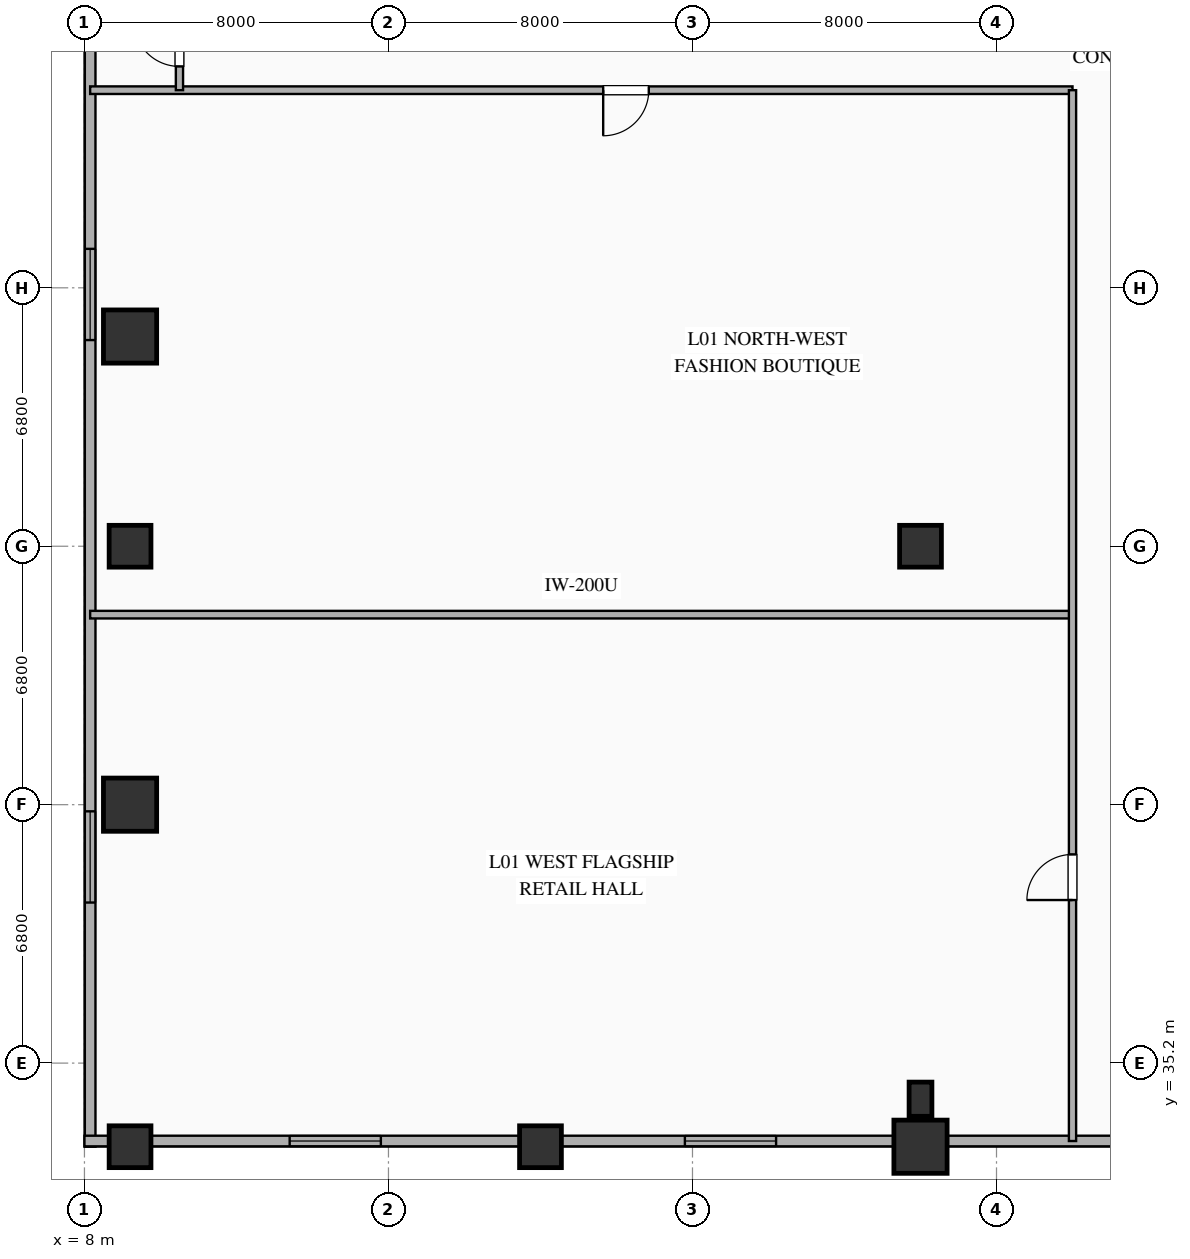
"""IFC4 building model, lengths in metres.
Left out: names, types, materials, properties, quantities, classifications, styles, units other than length and angle.
Written with IfcOpenShell. Run it as: python <this file> out.ifc"""

import sys

from ifc_helpers import new_model, si_unit, direction, frame, frame_2d, origin, origin_2d, place, context, subcontext, project, spatial, rectangle, extrude, element, fill, save


model = new_model("IFC4")
c1 = context("Model", 3, precision=1e-05, world=origin(), true_north=direction((0.0, 1.0)))
c2 = subcontext(c1, "Body", "Model", "MODEL_VIEW")
j1 = project(units=[si_unit("LENGTHUNIT", "METRE"), si_unit("PLANEANGLEUNIT", "RADIAN")], contexts=[c1])
p1 = place(None, origin())
s1 = spatial("IfcSite", under=j1, at=p1, CompositionType="ELEMENT")
p2 = place(p1, origin())
s2 = spatial("IfcBuilding", under=s1, at=p2, CompositionType="ELEMENT")
p3 = place(p2, frame((0.0, 0.0, 6.0)))
s3 = spatial("IfcBuildingStorey", under=s2, at=p3, CompositionType="ELEMENT", Elevation=6.0)
for number, where, z_axis, x_axis in (
    (1, (9.2, 33.0, 0.0), (0.0, 0.0, 1.0), (1.0, 0.0, 0.0)),
    (2, (9.2, 48.8, 0.0), (0.0, 0.0, 1.0), (1.0, 0.0, 0.0)),
    (3, (20.0, 33.0, 0.0), (0.0, 0.0, 1.0), (1.0, 0.0, 0.0)),
):
    element("IfcColumn", number, at=place(p3, frame(where, z_axis=z_axis, x_axis=x_axis)), inside=s3, PredefinedType="COLUMN", context=c2, shape_type="SweptSolid", body=[
        extrude(rectangle(XDim=1.1, YDim=1.1, at=origin_2d()), origin(), (0.0, 0.0, 1.0), 5.12),
    ])
p4 = place(p3, frame((30.0, 33.0, 0.0), z_axis=(0.0, 0.0, 1.0), x_axis=(1.0, 0.0, 0.0)))
e4 = element("IfcColumn", 4, at=p4, inside=s3, PredefinedType="COLUMN", context=c2, shape_type="SweptSolid", body=[
    extrude(rectangle(XDim=1.4, YDim=1.4, at=origin_2d()), origin(), (0.0, 0.0, 1.0), 5.12),
])
p5 = place(p3, frame((30.0, 48.8, 0.0), z_axis=(0.0, 0.0, 1.0), x_axis=(1.0, 0.0, 0.0)))
e5 = element("IfcColumn", 5, at=p5, inside=s3, PredefinedType="COLUMN", context=c2, shape_type="SweptSolid", body=[
    extrude(rectangle(XDim=1.1, YDim=1.1, at=origin_2d()), origin(), (0.0, 0.0, 1.0), 5.12),
])
for number, where, z_axis, x_axis in (
    (6, (9.2, 54.318, 0.0), (0.0, 0.0, 1.0), (1.0, 0.0, 0.0)),
    (7, (9.2, 42.0, 0.0), (0.0, 0.0, 1.0), (1.0, 0.0, 0.0)),
):
    element("IfcColumn", number, at=place(p3, frame(where, z_axis=z_axis, x_axis=x_axis)), inside=s3, PredefinedType="COLUMN", context=c2, shape_type="SweptSolid", body=[
        extrude(rectangle(XDim=1.4, YDim=1.4, at=origin_2d()), origin(), (0.0, 0.0, 1.0), 5.12),
    ])
p6 = place(p3, frame((30.0, 34.25, 0.0), z_axis=(0.0, 0.0, 1.0), x_axis=(1.0, 0.0, 0.0)))
e8 = element("IfcColumn", 8, at=p6, inside=s3, PredefinedType="PILASTER", context=c2, shape_type="SweptSolid", body=[
    extrude(rectangle(XDim=0.6, YDim=0.9, at=origin_2d()), origin(), (0.0, 0.0, 1.0), 5.12),
])
p7 = place(p3, frame((8.15, 33.0, 0.0), z_axis=(0.0, 0.0, 1.0), x_axis=(0.0, 1.0, 0.0)))
e9 = element("IfcWall", 9, at=p7, inside=s3, PredefinedType="SOLIDWALL", context=c2, shape_type="SweptSolid", body=[
    extrude(rectangle(XDim=41.35, YDim=0.28, at=frame_2d((20.675, 0.0))), origin(), (0.0, 0.0, 1.0), 5.12),
])
p8 = place(p7, frame((6.425, 0.0, 0.9)))
e10 = element("IfcOpeningElement", 10, at=p8, cuts=e9, PredefinedType="OPENING", context=c2, shape_type="SweptSolid", body=[
    extrude(rectangle(XDim=2.4, YDim=2.6, at=frame_2d((1.2, 1.3))), frame((0.0, 0.15, 0.0), z_axis=(0.0, -1.0, 0.0), x_axis=(1.0, 0.0, 0.0)), (0.0, 0.0, 1.0), 0.3),
])
p9 = place(p7, frame((21.225, 0.0, 0.9)))
e11 = element("IfcOpeningElement", 11, at=p9, cuts=e9, PredefinedType="OPENING", context=c2, shape_type="SweptSolid", body=[
    extrude(rectangle(XDim=2.4, YDim=2.6, at=frame_2d((1.2, 1.3))), frame((0.0, 0.15, 0.0), z_axis=(0.0, -1.0, 0.0), x_axis=(1.0, 0.0, 0.0)), (0.0, 0.0, 1.0), 0.3),
])
p10 = place(p7, frame((34.9, 0.0, 0.9)))
e12 = element("IfcOpeningElement", 12, at=p10, cuts=e9, PredefinedType="OPENING", context=c2, shape_type="SweptSolid", body=[
    extrude(rectangle(XDim=2.4, YDim=2.6, at=frame_2d((1.2, 1.3))), frame((0.0, 0.15, 0.0), z_axis=(0.0, -1.0, 0.0), x_axis=(1.0, 0.0, 0.0)), (0.0, 0.0, 1.0), 0.3),
])
p11 = place(p3, frame((88.0, 33.15, 0.0), z_axis=(0.0, 0.0, 1.0), x_axis=(-1.0, 0.0, 0.0)))
e13 = element("IfcWall", 13, at=p11, inside=s3, PredefinedType="SOLIDWALL", context=c2, shape_type="SweptSolid", body=[
    extrude(rectangle(XDim=80.0, YDim=0.28, at=frame_2d((40.0, 0.0))), origin(), (0.0, 0.0, 1.0), 5.12),
])
p12 = place(p11, frame((5.4, 0.0, 0.9)))
e14 = element("IfcOpeningElement", 14, at=p12, cuts=e13, PredefinedType="OPENING", context=c2, shape_type="SweptSolid", body=[
    extrude(rectangle(XDim=2.4, YDim=2.6, at=frame_2d((1.2, 1.3))), frame((0.0, 0.15, 0.0), z_axis=(0.0, -1.0, 0.0), x_axis=(1.0, 0.0, 0.0)), (0.0, 0.0, 1.0), 0.3),
])
p13 = place(p11, frame((15.8, 0.0, 0.9)))
e15 = element("IfcOpeningElement", 15, at=p13, cuts=e13, PredefinedType="OPENING", context=c2, shape_type="SweptSolid", body=[
    extrude(rectangle(XDim=2.4, YDim=2.6, at=frame_2d((1.2, 1.3))), frame((0.0, 0.15, 0.0), z_axis=(0.0, -1.0, 0.0), x_axis=(1.0, 0.0, 0.0)), (0.0, 0.0, 1.0), 0.3),
])
p14 = place(p11, frame((38.8, 0.0, 0.9)))
e16 = element("IfcOpeningElement", 16, at=p14, cuts=e13, PredefinedType="OPENING", context=c2, shape_type="SweptSolid", body=[
    extrude(rectangle(XDim=2.4, YDim=2.6, at=frame_2d((1.2, 1.3))), frame((0.0, 0.15, 0.0), z_axis=(0.0, -1.0, 0.0), x_axis=(1.0, 0.0, 0.0)), (0.0, 0.0, 1.0), 0.3),
])
p15 = place(p11, frame((61.8, 0.0, 0.9)))
e17 = element("IfcOpeningElement", 17, at=p15, cuts=e13, PredefinedType="OPENING", context=c2, shape_type="SweptSolid", body=[
    extrude(rectangle(XDim=2.4, YDim=2.6, at=frame_2d((1.2, 1.3))), frame((0.0, 0.15, 0.0), z_axis=(0.0, -1.0, 0.0), x_axis=(1.0, 0.0, 0.0)), (0.0, 0.0, 1.0), 0.3),
])
p16 = place(p11, frame((72.2, 0.0, 0.9)))
e18 = element("IfcOpeningElement", 18, at=p16, cuts=e13, PredefinedType="OPENING", context=c2, shape_type="SweptSolid", body=[
    extrude(rectangle(XDim=2.4, YDim=2.6, at=frame_2d((1.2, 1.3))), frame((0.0, 0.15, 0.0), z_axis=(0.0, -1.0, 0.0), x_axis=(1.0, 0.0, 0.0)), (0.0, 0.0, 1.0), 0.3),
])
p17 = place(p3, frame((8.15, 47.0, 0.0), z_axis=(0.0, 0.0, 1.0), x_axis=(1.0, 0.0, 0.0)))
e19 = element("IfcWall", 19, at=p17, inside=s3, PredefinedType="PARTITIONING", context=c2, shape_type="SweptSolid", body=[
    extrude(rectangle(XDim=25.85, YDim=0.2, at=frame_2d((12.925, 0.0))), origin(), (0.0, 0.0, 1.0), 4.32),
])
p18 = place(p3, frame((34.0, 60.8, 0.0), z_axis=(0.0, 0.0, 1.0), x_axis=(-1.0, 0.0, 0.0)))
e20 = element("IfcWall", 20, at=p18, inside=s3, PredefinedType="PARTITIONING", context=c2, shape_type="SweptSolid", body=[
    extrude(rectangle(XDim=25.85, YDim=0.2, at=frame_2d((12.925, 0.0))), origin(), (0.0, 0.0, 1.0), 4.32),
])
p19 = place(p18, frame((11.15, 0.0, 0.0)))
e21 = element("IfcOpeningElement", 21, at=p19, cuts=e20, PredefinedType="OPENING", context=c2, shape_type="SweptSolid", body=[
    extrude(rectangle(XDim=1.2, YDim=2.25, at=frame_2d((0.6, 1.125))), frame((0.0, 0.11, 0.0), z_axis=(0.0, -1.0, 0.0), x_axis=(1.0, 0.0, 0.0)), (0.0, 0.0, 1.0), 0.22),
])
p20 = place(p3, frame((34.0, 33.15, 0.0), z_axis=(0.0, 0.0, 1.0), x_axis=(0.0, 1.0, 0.0)))
e22 = element("IfcWall", 22, at=p20, inside=s3, PredefinedType="PARTITIONING", context=c2, shape_type="SweptSolid", body=[
    extrude(rectangle(XDim=27.65, YDim=0.19, at=frame_2d((13.825, 0.0))), origin(), (0.0, 0.0, 1.0), 4.32),
])
p21 = place(p20, frame((6.341, 0.0, 0.0)))
e23 = element("IfcOpeningElement", 23, at=p21, cuts=e22, PredefinedType="OPENING", context=c2, shape_type="SweptSolid", body=[
    extrude(rectangle(XDim=1.2, YDim=2.25, at=frame_2d((0.6, 1.125))), frame((0.0, 0.105, 0.0), z_axis=(0.0, -1.0, 0.0), x_axis=(1.0, 0.0, 0.0)), (0.0, 0.0, 1.0), 0.21),
])
p22 = place(p3, frame((10.5, 60.8, 0.0), z_axis=(0.0, 0.0, 1.0), x_axis=(0.0, 1.0, 0.0)))
e24 = element("IfcWall", 24, at=p22, inside=s3, PredefinedType="PARTITIONING", context=c2, shape_type="SweptSolid", body=[
    extrude(rectangle(XDim=3.05, YDim=0.19, at=frame_2d((1.525, 0.0))), origin(), (0.0, 0.0, 1.0), 4.32),
])
p23 = place(p22, frame((0.625, 0.0, 0.0)))
e25 = element("IfcOpeningElement", 25, at=p23, cuts=e24, PredefinedType="OPENING", context=c2, shape_type="SweptSolid", body=[
    extrude(rectangle(XDim=1.2, YDim=2.25, at=frame_2d((0.6, 1.125))), frame((0.0, 0.105, 0.0), z_axis=(0.0, -1.0, 0.0), x_axis=(1.0, 0.0, 0.0)), (0.0, 0.0, 1.0), 0.21),
])
p24 = place(p8, origin())
e26 = element("IfcWindow", 26, at=p24, inside=s3, PartitioningType="SINGLE_PANEL", PredefinedType="WINDOW", context=c2, shape_type="SweptSolid", body=[
    extrude(rectangle(XDim=2.4, YDim=2.6, at=frame_2d((1.2, 1.3))), frame((0.0, 0.03, 0.0), z_axis=(0.0, -1.0, 0.0), x_axis=(1.0, 0.0, 0.0)), (0.0, 0.0, 1.0), 0.06),
])
fill(e10, e26)
p25 = place(p9, origin())
e27 = element("IfcWindow", 27, at=p25, inside=s3, PartitioningType="SINGLE_PANEL", PredefinedType="WINDOW", context=c2, shape_type="SweptSolid", body=[
    extrude(rectangle(XDim=2.4, YDim=2.6, at=frame_2d((1.2, 1.3))), frame((0.0, 0.03, 0.0), z_axis=(0.0, -1.0, 0.0), x_axis=(1.0, 0.0, 0.0)), (0.0, 0.0, 1.0), 0.06),
])
fill(e11, e27)
p26 = place(p15, origin())
e28 = element("IfcWindow", 28, at=p26, inside=s3, PartitioningType="SINGLE_PANEL", PredefinedType="WINDOW", context=c2, shape_type="SweptSolid", body=[
    extrude(rectangle(XDim=2.4, YDim=2.6, at=frame_2d((1.2, 1.3))), frame((0.0, 0.03, 0.0), z_axis=(0.0, -1.0, 0.0), x_axis=(1.0, 0.0, 0.0)), (0.0, 0.0, 1.0), 0.06),
])
fill(e17, e28)
p27 = place(p16, origin())
e29 = element("IfcWindow", 29, at=p27, inside=s3, PartitioningType="SINGLE_PANEL", PredefinedType="WINDOW", context=c2, shape_type="SweptSolid", body=[
    extrude(rectangle(XDim=2.4, YDim=2.6, at=frame_2d((1.2, 1.3))), frame((0.0, 0.03, 0.0), z_axis=(0.0, -1.0, 0.0), x_axis=(1.0, 0.0, 0.0)), (0.0, 0.0, 1.0), 0.06),
])
fill(e18, e29)
p28 = place(p19, origin())
e30 = element("IfcDoor", 30, at=p28, inside=s3, OperationType="SINGLE_SWING_RIGHT", PredefinedType="DOOR", context=c2, shape_type="SweptSolid", body=[
    extrude(rectangle(XDim=1.2, YDim=2.25, at=frame_2d((0.6, 1.125))), frame((0.0, 0.025, 0.0), z_axis=(0.0, -1.0, 0.0), x_axis=(1.0, 0.0, 0.0)), (0.0, 0.0, 1.0), 0.05),
])
fill(e21, e30)
p29 = place(p21, origin())
e31 = element("IfcDoor", 31, at=p29, inside=s3, OperationType="SINGLE_SWING_LEFT", PredefinedType="DOOR", context=c2, shape_type="SweptSolid", body=[
    extrude(rectangle(XDim=1.2, YDim=2.25, at=frame_2d((0.6, 1.125))), frame((0.0, 0.025, 0.0), z_axis=(0.0, -1.0, 0.0), x_axis=(1.0, 0.0, 0.0)), (0.0, 0.0, 1.0), 0.05),
])
fill(e23, e31)
p30 = place(p23, origin())
e32 = element("IfcDoor", 32, at=p30, inside=s3, OperationType="SINGLE_SWING_RIGHT", PredefinedType="DOOR", context=c2, shape_type="SweptSolid", body=[
    extrude(rectangle(XDim=1.2, YDim=2.25, at=frame_2d((0.6, 1.125))), frame((0.0, 0.025, 0.0), z_axis=(0.0, -1.0, 0.0), x_axis=(1.0, 0.0, 0.0)), (0.0, 0.0, 1.0), 0.05),
])
fill(e25, e32)
save(model, sys.argv[1])
